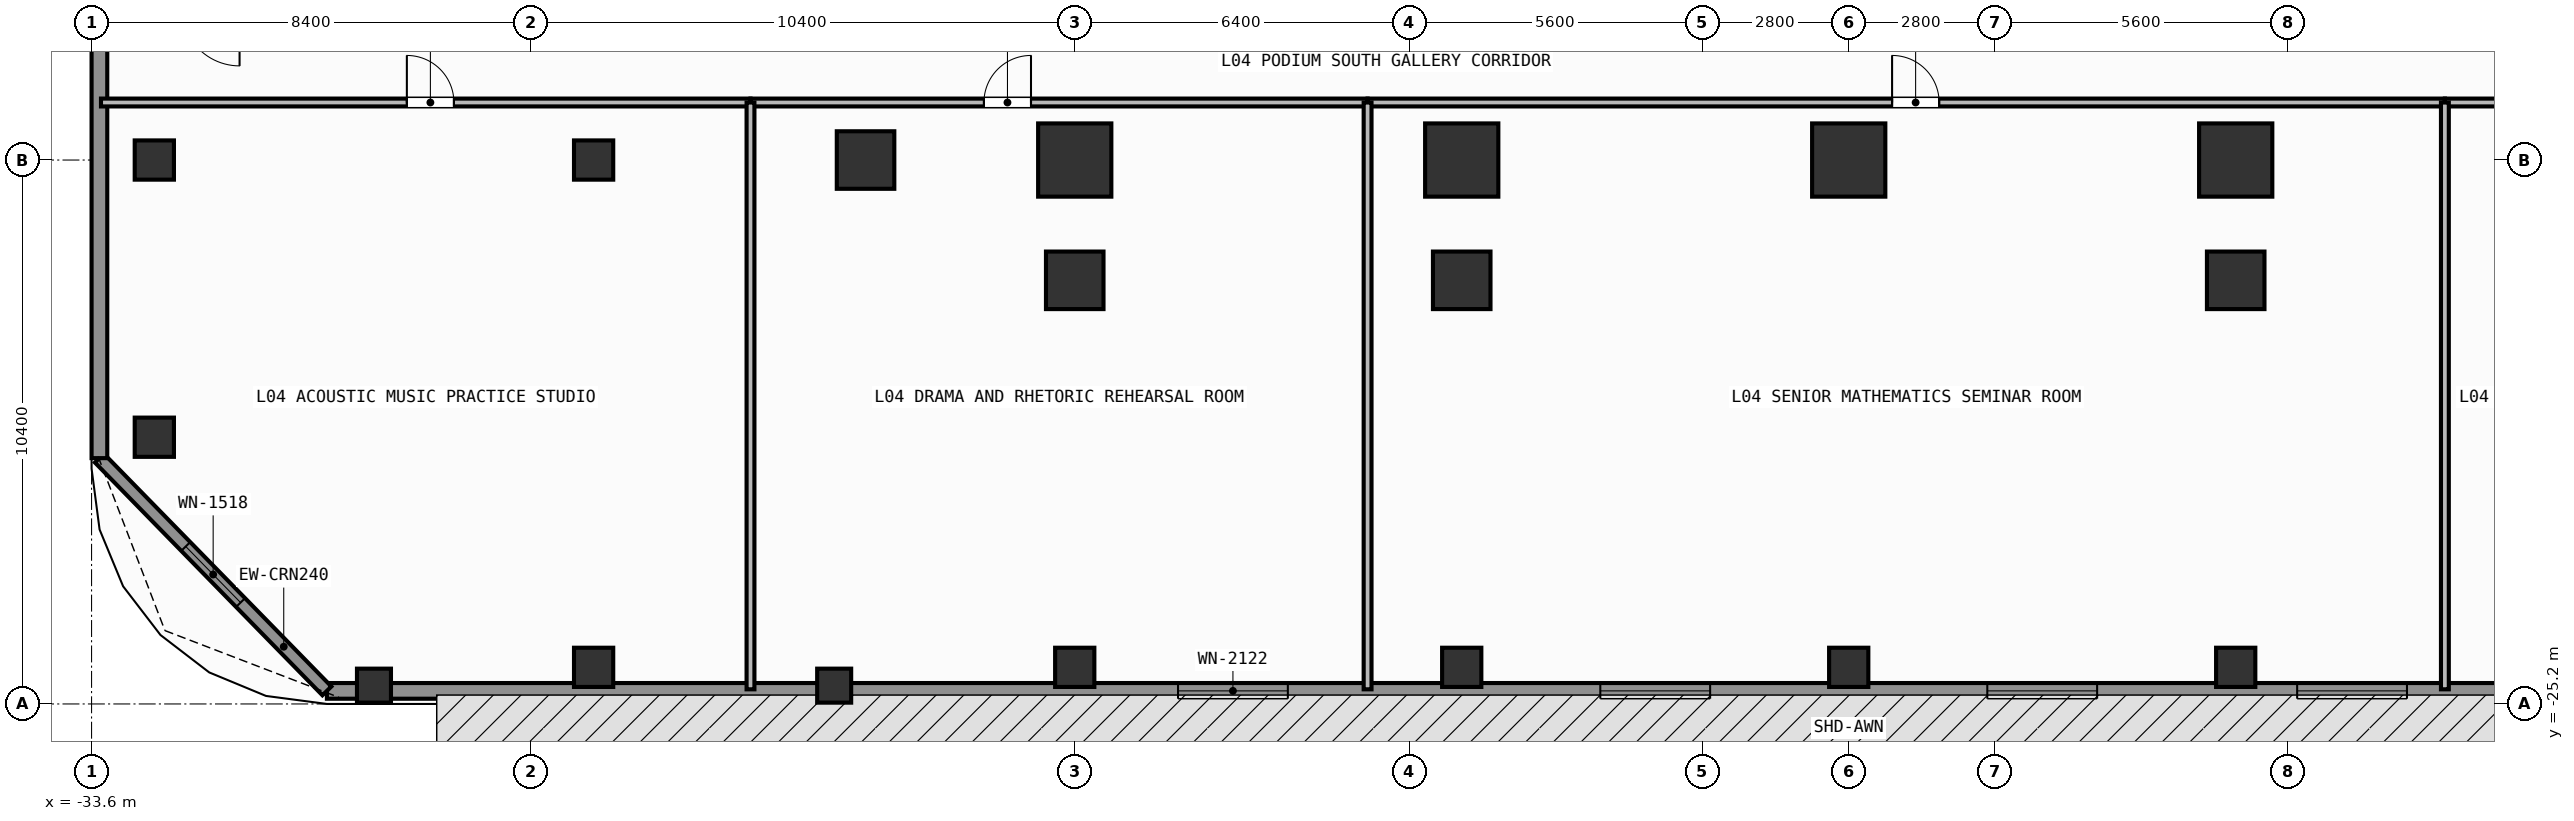
"""IFC4 building model, lengths in metres.
Left out: names, types, materials, properties, quantities, classifications, styles, units other than length and angle.
Written with IfcOpenShell. Run it as: python <this file> out.ifc"""

import sys

from ifc_helpers import new_model, si_unit, direction, frame, frame_2d, origin, origin_2d, place, context, subcontext, project, spatial, rectangle, extrude, element, fill, save


model = new_model("IFC4")
c1 = context("Model", 3, precision=1e-05, world=origin(), true_north=direction((0.0, 1.0)))
c2 = subcontext(c1, "Body", "Model", "MODEL_VIEW")
j1 = project(units=[si_unit("LENGTHUNIT", "METRE"), si_unit("PLANEANGLEUNIT", "RADIAN")], contexts=[c1])
p1 = place(None, origin())
s1 = spatial("IfcSite", under=j1, at=p1, CompositionType="ELEMENT")
p2 = place(p1, origin())
s2 = spatial("IfcBuilding", under=s1, at=p2, CompositionType="ELEMENT")
p3 = place(p2, frame((0.0, 0.0, 13.2)))
s3 = spatial("IfcBuildingStorey", under=s2, at=p3, CompositionType="ELEMENT", Elevation=13.2)
for number, where, z_axis, x_axis in (
    (1, (-14.8, -14.8, 0.0), (0.0, 0.0, 1.0), (1.0, 0.0, 0.0)),
    (2, (-7.4, -14.8, 0.0), (0.0, 0.0, 1.0), (1.0, 0.0, 0.0)),
    (3, (0.0, -14.8, 0.0), (0.0, 0.0, 1.0), (1.0, 0.0, 0.0)),
    (4, (7.4, -14.8, 0.0), (0.0, 0.0, 1.0), (1.0, 0.0, 0.0)),
):
    element("IfcColumn", number, at=place(p3, frame(where, z_axis=z_axis, x_axis=x_axis)), inside=s3, PredefinedType="COLUMN", context=c2, shape_type="SweptSolid", body=[
        extrude(rectangle(XDim=1.4, YDim=1.4, at=origin_2d()), origin(), (0.0, 0.0, 1.0), 4.2),
    ])
for number, where, z_axis, x_axis in (
    (5, (-18.8, -14.8, 0.0), (0.0, 0.0, 1.0), (1.0, 0.0, 0.0)),
    (6, (-14.8, -17.1, 0.0), (0.0, 0.0, 1.0), (1.0, 0.0, 0.0)),
    (7, (-7.4, -17.1, 0.0), (0.0, 0.0, 1.0), (1.0, 0.0, 0.0)),
    (8, (7.4, -17.1, 0.0), (0.0, 0.0, 1.0), (1.0, 0.0, 0.0)),
):
    element("IfcColumn", number, at=place(p3, frame(where, z_axis=z_axis, x_axis=x_axis)), inside=s3, PredefinedType="COLUMN", context=c2, shape_type="SweptSolid", body=[
        extrude(rectangle(XDim=1.1, YDim=1.1, at=origin_2d()), origin(), (0.0, 0.0, 1.0), 4.2),
    ])
for number, where, z_axis, x_axis in (
    (9, (-32.4, -14.8, 0.0), (0.0, 0.0, 1.0), (1.0, 0.0, 0.0)),
    (10, (-24.0, -24.5, 0.0), (0.0, 0.0, 1.0), (1.0, 0.0, 0.0)),
    (11, (-24.0, -14.8, 0.0), (0.0, 0.0, 1.0), (1.0, 0.0, 0.0)),
    (12, (-14.8, -24.5, 0.0), (0.0, 0.0, 1.0), (1.0, 0.0, 0.0)),
    (13, (-7.4, -24.5, 0.0), (0.0, 0.0, 1.0), (1.0, 0.0, 0.0)),
    (14, (0.0, -24.5, 0.0), (0.0, 0.0, 1.0), (1.0, 0.0, 0.0)),
    (15, (7.4, -24.5, 0.0), (0.0, 0.0, 1.0), (1.0, 0.0, 0.0)),
    (16, (-32.4, -20.1, 0.0), (0.0, 0.0, 1.0), (1.0, 0.0, 0.0)),
):
    element("IfcColumn", number, at=place(p3, frame(where, z_axis=z_axis, x_axis=x_axis)), inside=s3, PredefinedType="COLUMN", context=c2, shape_type="SweptSolid", body=[
        extrude(rectangle(XDim=0.75, YDim=0.75, at=origin_2d()), origin(), (0.0, 0.0, 1.0), 4.2),
    ])
for number, where, z_axis, x_axis in (
    (17, (-28.2, -24.85, 0.0), (0.0, 0.0, 1.0), (1.0, 0.0, 0.0)),
    (18, (-19.4, -24.85, 0.0), (0.0, 0.0, 1.0), (1.0, 0.0, 0.0)),
):
    element("IfcColumn", number, at=place(p3, frame(where, z_axis=z_axis, x_axis=x_axis)), inside=s3, PredefinedType="PILASTER", context=c2, shape_type="SweptSolid", body=[
        extrude(rectangle(XDim=0.65, YDim=0.65, at=origin_2d()), origin(), (0.0, 0.0, 1.0), 4.2),
    ])
p4 = place(p3, frame((29.1, -24.95, 0.0), z_axis=(0.0, 0.0, 1.0), x_axis=(-1.0, 0.0, 0.0)))
e19 = element("IfcWall", 19, at=p4, inside=s3, PredefinedType="SOLIDWALL", context=c2, shape_type="SweptSolid", body=[
    extrude(rectangle(XDim=58.2, YDim=0.3, at=frame_2d((29.1, 0.0))), origin(), (0.0, 0.0, 1.0), 3.96),
])
p5 = place(p4, frame((39.825, 0.0, 0.85)))
e20 = element("IfcOpeningElement", 20, at=p5, cuts=e19, PredefinedType="OPENING", context=c2, shape_type="SweptSolid", body=[
    extrude(rectangle(XDim=2.1, YDim=2.2, at=frame_2d((1.05, 1.1))), frame((0.0, 0.16, 0.0), z_axis=(0.0, -1.0, 0.0), x_axis=(1.0, 0.0, 0.0)), (0.0, 0.0, 1.0), 0.32),
])
p6 = place(p4, frame((31.75, 0.0, 0.85)))
e21 = element("IfcOpeningElement", 21, at=p6, cuts=e19, PredefinedType="OPENING", context=c2, shape_type="SweptSolid", body=[
    extrude(rectangle(XDim=2.1, YDim=2.2, at=frame_2d((1.05, 1.1))), frame((0.0, 0.16, 0.0), z_axis=(0.0, -1.0, 0.0), x_axis=(1.0, 0.0, 0.0)), (0.0, 0.0, 1.0), 0.32),
])
p7 = place(p4, frame((24.35, 0.0, 0.85)))
e22 = element("IfcOpeningElement", 22, at=p7, cuts=e19, PredefinedType="OPENING", context=c2, shape_type="SweptSolid", body=[
    extrude(rectangle(XDim=2.1, YDim=2.2, at=frame_2d((1.05, 1.1))), frame((0.0, 0.16, 0.0), z_axis=(0.0, -1.0, 0.0), x_axis=(1.0, 0.0, 0.0)), (0.0, 0.0, 1.0), 0.32),
])
p8 = place(p4, frame((18.425, 0.0, 0.85)))
e23 = element("IfcOpeningElement", 23, at=p8, cuts=e19, PredefinedType="OPENING", context=c2, shape_type="SweptSolid", body=[
    extrude(rectangle(XDim=2.1, YDim=2.2, at=frame_2d((1.05, 1.1))), frame((0.0, 0.16, 0.0), z_axis=(0.0, -1.0, 0.0), x_axis=(1.0, 0.0, 0.0)), (0.0, 0.0, 1.0), 0.32),
])
p9 = place(p3, frame((-29.1, -24.95, 0.0), z_axis=(0.0, 0.0, 1.0), x_axis=(-0.69901822973, 0.715103848756, 0.0)))
e24 = element("IfcWall", 24, at=p9, inside=s3, PredefinedType="SOLIDWALL", context=c2, shape_type="SweptSolid", body=[
    extrude(rectangle(XDim=6.223, YDim=0.24, at=frame_2d((3.111, 0.0))), origin(), (0.0, 0.0, 1.0), 3.96),
])
p10 = place(p9, frame((2.362, 0.0, 0.85)))
e25 = element("IfcOpeningElement", 25, at=p10, cuts=e24, PredefinedType="OPENING", context=c2, shape_type="SweptSolid", body=[
    extrude(rectangle(XDim=1.5, YDim=1.85, at=frame_2d((0.75, 0.925))), frame((0.0, 0.13, 0.0), z_axis=(0.0, -1.0, 0.0), x_axis=(1.0, 0.0, 0.0)), (0.0, 0.0, 1.0), 0.26),
])
p11 = place(p3, frame((-33.45, -20.5, 0.0), z_axis=(0.0, 0.0, 1.0), x_axis=(0.0, 1.0, 0.0)))
e26 = element("IfcWall", 26, at=p11, inside=s3, PredefinedType="SOLIDWALL", context=c2, shape_type="SweptSolid", body=[
    extrude(rectangle(XDim=14.09, YDim=0.3, at=frame_2d((7.045, 0.0))), origin(), (0.0, 0.0, 1.0), 3.96),
])
p12 = place(p3, frame((-33.42, -13.7, 0.0), z_axis=(0.0, 0.0, 1.0), x_axis=(1.0, 0.0, 0.0)))
e27 = element("IfcWall", 27, at=p12, inside=s3, PredefinedType="PARTITIONING", context=c2, shape_type="SweptSolid", body=[
    extrude(rectangle(XDim=12.42, YDim=0.15, at=frame_2d((6.21, 0.0))), origin(), (0.0, 0.0, 1.0), 3.96),
])
p13 = place(p12, frame((5.849, 0.0, 0.0)))
e28 = element("IfcOpeningElement", 28, at=p13, cuts=e27, PredefinedType="OPENING", context=c2, shape_type="SweptSolid", body=[
    extrude(rectangle(XDim=0.9, YDim=2.1, at=frame_2d((0.45, 1.05))), frame((0.0, 0.085, 0.0), z_axis=(0.0, -1.0, 0.0), x_axis=(1.0, 0.0, 0.0)), (0.0, 0.0, 1.0), 0.17),
])
p14 = place(p3, frame((-21.0, -13.7, 0.0), z_axis=(0.0, 0.0, 1.0), x_axis=(1.0, 0.0, 0.0)))
e29 = element("IfcWall", 29, at=p14, inside=s3, PredefinedType="PARTITIONING", context=c2, shape_type="SweptSolid", body=[
    extrude(rectangle(XDim=11.8, YDim=0.15, at=frame_2d((5.9, 0.0))), origin(), (0.0, 0.0, 1.0), 3.96),
])
p15 = place(p14, frame((4.464, 0.0, 0.0)))
e30 = element("IfcOpeningElement", 30, at=p15, cuts=e29, PredefinedType="OPENING", context=c2, shape_type="SweptSolid", body=[
    extrude(rectangle(XDim=0.9, YDim=2.1, at=frame_2d((0.45, 1.05))), frame((0.0, 0.085, 0.0), z_axis=(0.0, -1.0, 0.0), x_axis=(1.0, 0.0, 0.0)), (0.0, 0.0, 1.0), 0.17),
])
p16 = place(p3, frame((-9.2, -13.7, 0.0), z_axis=(0.0, 0.0, 1.0), x_axis=(1.0, 0.0, 0.0)))
e31 = element("IfcWall", 31, at=p16, inside=s3, PredefinedType="PARTITIONING", context=c2, shape_type="SweptSolid", body=[
    extrude(rectangle(XDim=20.6, YDim=0.15, at=frame_2d((10.3, 0.0))), origin(), (0.0, 0.0, 1.0), 3.96),
])
p17 = place(p16, frame((10.029, 0.0, 0.0)))
e32 = element("IfcOpeningElement", 32, at=p17, cuts=e31, PredefinedType="OPENING", context=c2, shape_type="SweptSolid", body=[
    extrude(rectangle(XDim=0.9, YDim=2.1, at=frame_2d((0.45, 1.05))), frame((0.0, 0.085, 0.0), z_axis=(0.0, -1.0, 0.0), x_axis=(1.0, 0.0, 0.0)), (0.0, 0.0, 1.0), 0.17),
])
p18 = place(p3, frame((11.4, -13.7, 0.0), z_axis=(0.0, 0.0, 1.0), x_axis=(1.0, 0.0, 0.0)))
e33 = element("IfcWall", 33, at=p18, inside=s3, PredefinedType="PARTITIONING", context=c2, shape_type="SweptSolid", body=[
    extrude(rectangle(XDim=6.25, YDim=0.15, at=frame_2d((3.125, 0.0))), origin(), (0.0, 0.0, 1.0), 3.96),
])
p19 = place(p18, frame((1.597, 0.0, 0.0)))
e34 = element("IfcOpeningElement", 34, at=p19, cuts=e33, PredefinedType="OPENING", context=c2, shape_type="SweptSolid", body=[
    extrude(rectangle(XDim=0.9, YDim=2.1, at=frame_2d((0.45, 1.05))), frame((0.0, 0.085, 0.0), z_axis=(0.0, -1.0, 0.0), x_axis=(1.0, 0.0, 0.0)), (0.0, 0.0, 1.0), 0.17),
])
for number, where, z_axis, x_axis in (
    (35, (-21.0, -24.92, 0.0), (0.0, 0.0, 1.0), (0.0, 1.0, 0.0)),
    (36, (-9.2, -24.92, 0.0), (0.0, 0.0, 1.0), (0.0, 1.0, 0.0)),
    (37, (11.4, -24.92, 0.0), (0.0, 0.0, 1.0), (0.0, 1.0, 0.0)),
):
    element("IfcWall", number, at=place(p3, frame(where, z_axis=z_axis, x_axis=x_axis)), inside=s3, PredefinedType="PARTITIONING", context=c2, shape_type="SweptSolid", body=[
        extrude(rectangle(XDim=11.22, YDim=0.15, at=frame_2d((5.61, 0.0))), origin(), (0.0, 0.0, 1.0), 3.96),
    ])
p20 = place(p10, origin())
e38 = element("IfcWindow", 38, at=p20, inside=s3, PartitioningType="SINGLE_PANEL", PredefinedType="WINDOW", context=c2, shape_type="SweptSolid", body=[
    extrude(rectangle(XDim=1.5, YDim=1.85, at=frame_2d((0.75, 0.925))), frame((0.0, 0.03, 0.0), z_axis=(0.0, -1.0, 0.0), x_axis=(1.0, 0.0, 0.0)), (0.0, 0.0, 1.0), 0.06),
])
fill(e25, e38)
p21 = place(p5, origin())
e39 = element("IfcWindow", 39, at=p21, inside=s3, PartitioningType="SINGLE_PANEL", PredefinedType="WINDOW", context=c2, shape_type="SweptSolid", body=[
    extrude(rectangle(XDim=2.1, YDim=2.2, at=frame_2d((1.05, 1.1))), frame((0.0, 0.03, 0.0), z_axis=(0.0, -1.0, 0.0), x_axis=(1.0, 0.0, 0.0)), (0.0, 0.0, 1.0), 0.06),
])
fill(e20, e39)
p22 = place(p6, origin())
e40 = element("IfcWindow", 40, at=p22, inside=s3, PartitioningType="SINGLE_PANEL", PredefinedType="WINDOW", context=c2, shape_type="SweptSolid", body=[
    extrude(rectangle(XDim=2.1, YDim=2.2, at=frame_2d((1.05, 1.1))), frame((0.0, 0.03, 0.0), z_axis=(0.0, -1.0, 0.0), x_axis=(1.0, 0.0, 0.0)), (0.0, 0.0, 1.0), 0.06),
])
fill(e21, e40)
p23 = place(p7, origin())
e41 = element("IfcWindow", 41, at=p23, inside=s3, PartitioningType="SINGLE_PANEL", PredefinedType="WINDOW", context=c2, shape_type="SweptSolid", body=[
    extrude(rectangle(XDim=2.1, YDim=2.2, at=frame_2d((1.05, 1.1))), frame((0.0, 0.03, 0.0), z_axis=(0.0, -1.0, 0.0), x_axis=(1.0, 0.0, 0.0)), (0.0, 0.0, 1.0), 0.06),
])
fill(e22, e41)
p24 = place(p8, origin())
e42 = element("IfcWindow", 42, at=p24, inside=s3, PartitioningType="SINGLE_PANEL", PredefinedType="WINDOW", context=c2, shape_type="SweptSolid", body=[
    extrude(rectangle(XDim=2.1, YDim=2.2, at=frame_2d((1.05, 1.1))), frame((0.0, 0.03, 0.0), z_axis=(0.0, -1.0, 0.0), x_axis=(1.0, 0.0, 0.0)), (0.0, 0.0, 1.0), 0.06),
])
fill(e23, e42)
p25 = place(p13, origin())
e43 = element("IfcDoor", 43, at=p25, inside=s3, OperationType="SINGLE_SWING_LEFT", PredefinedType="DOOR", context=c2, shape_type="SweptSolid", body=[
    extrude(rectangle(XDim=0.9, YDim=2.1, at=frame_2d((0.45, 1.05))), frame((0.0, 0.025, 0.0), z_axis=(0.0, -1.0, 0.0), x_axis=(1.0, 0.0, 0.0)), (0.0, 0.0, 1.0), 0.05),
])
fill(e28, e43)
p26 = place(p15, origin())
e44 = element("IfcDoor", 44, at=p26, inside=s3, OperationType="SINGLE_SWING_RIGHT", PredefinedType="DOOR", context=c2, shape_type="SweptSolid", body=[
    extrude(rectangle(XDim=0.9, YDim=2.1, at=frame_2d((0.45, 1.05))), frame((0.0, 0.025, 0.0), z_axis=(0.0, -1.0, 0.0), x_axis=(1.0, 0.0, 0.0)), (0.0, 0.0, 1.0), 0.05),
])
fill(e30, e44)
p27 = place(p17, origin())
e45 = element("IfcDoor", 45, at=p27, inside=s3, OperationType="SINGLE_SWING_LEFT", PredefinedType="DOOR", context=c2, shape_type="SweptSolid", body=[
    extrude(rectangle(XDim=0.9, YDim=2.1, at=frame_2d((0.45, 1.05))), frame((0.0, 0.025, 0.0), z_axis=(0.0, -1.0, 0.0), x_axis=(1.0, 0.0, 0.0)), (0.0, 0.0, 1.0), 0.05),
])
fill(e32, e45)
save(model, sys.argv[1])
